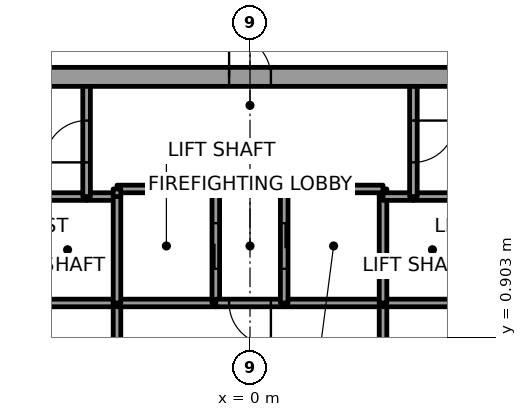
"""IFC4 building model, lengths in metres.
Left out: names, types, materials, properties, quantities, classifications, styles, units other than length and angle.
Written with IfcOpenShell. Run it as: python <this file> out.ifc"""

import sys

from ifc_helpers import new_model, si_unit, direction, frame, frame_2d, origin, place, context, subcontext, project, spatial, rectangle, extrude, element, fill, save


model = new_model("IFC4")
c1 = context("Model", 3, precision=1e-05, world=origin(), true_north=direction((0.0, 1.0)))
c2 = subcontext(c1, "Body", "Model", "MODEL_VIEW")
j1 = project(units=[si_unit("LENGTHUNIT", "METRE"), si_unit("PLANEANGLEUNIT", "RADIAN")], contexts=[c1])
p1 = place(None, origin())
s1 = spatial("IfcSite", under=j1, at=p1, CompositionType="ELEMENT")
p2 = place(p1, origin())
s2 = spatial("IfcBuilding", under=s1, at=p2, CompositionType="ELEMENT")
p3 = place(p2, frame((0.0, 0.0, 137.8)))
s3 = spatial("IfcBuildingStorey", under=s2, at=p3, CompositionType="ELEMENT", Elevation=137.8)
p4 = place(p3, frame((-11.0, 7.75, 0.0), z_axis=(0.0, 0.0, 1.0), x_axis=(1.0, 0.0, 0.0)))
e1 = element("IfcWall", 1, at=p4, inside=s3, PredefinedType="SHEAR", context=c2, shape_type="SweptSolid", body=[
    extrude(rectangle(XDim=22.0, YDim=0.5, at=frame_2d((11.0, 0.0))), origin(), (0.0, 0.0, 1.0), 4.0),
])
p5 = place(p4, frame((10.45, 0.0, 0.0)))
e2 = element("IfcOpeningElement", 2, at=p5, cuts=e1, PredefinedType="OPENING", context=c2, shape_type="SweptSolid", body=[
    extrude(rectangle(XDim=1.1, YDim=2.1, at=frame_2d((0.55, 1.05))), frame((0.0, 0.25, 0.0), z_axis=(0.0, -1.0, 0.0), x_axis=(1.0, 0.0, 0.0)), (0.0, 0.0, 1.0), 0.5),
])
p6 = place(p3, frame((-3.5, 1.8, 0.0), z_axis=(0.0, 0.0, 1.0), x_axis=(-1.0, 0.0, 0.0)))
e3 = element("IfcWall", 3, at=p6, inside=s3, PredefinedType="SOLIDWALL", context=c2, shape_type="SweptSolid", body=[
    extrude(rectangle(XDim=2.6, YDim=0.2, at=frame_2d((1.3, 0.0))), origin(), (0.0, 0.0, 1.0), 3.85),
])
p7 = place(p3, frame((-4.3, 4.6, 0.0), z_axis=(0.0, 0.0, 1.0), x_axis=(-1.0, 0.0, 0.0)))
e4 = element("IfcWall", 4, at=p7, inside=s3, PredefinedType="SOLIDWALL", context=c2, shape_type="SweptSolid", body=[
    extrude(rectangle(XDim=1.8, YDim=0.2, at=frame_2d((0.9, 0.0))), origin(), (0.0, 0.0, 1.0), 3.85),
])
p8 = place(p3, frame((-3.5, 4.6, 0.0), z_axis=(0.0, 0.0, 1.0), x_axis=(-1.0, 0.0, 0.0)))
e5 = element("IfcWall", 5, at=p8, inside=s3, PredefinedType="SOLIDWALL", context=c2, shape_type="SweptSolid", body=[
    extrude(rectangle(XDim=0.8, YDim=0.2, at=frame_2d((0.4, 0.0))), origin(), (0.0, 0.0, 1.0), 3.85),
])
p9 = place(p3, frame((-4.3, 4.6, 0.0), z_axis=(0.0, 0.0, 1.0), x_axis=(0.0, 1.0, 0.0)))
e6 = element("IfcWall", 6, at=p9, inside=s3, PredefinedType="SOLIDWALL", context=c2, shape_type="SweptSolid", body=[
    extrude(rectangle(XDim=2.9, YDim=0.2, at=frame_2d((1.45, 0.0))), origin(), (0.0, 0.0, 1.0), 3.85),
])
p10 = place(p9, frame((0.9, 0.0, 0.0)))
e7 = element("IfcOpeningElement", 7, at=p10, cuts=e6, PredefinedType="OPENING", context=c2, shape_type="SweptSolid", body=[
    extrude(rectangle(XDim=1.1, YDim=2.1, at=frame_2d((0.55, 1.05))), frame((0.0, 0.1, 0.0), z_axis=(0.0, -1.0, 0.0), x_axis=(1.0, 0.0, 0.0)), (0.0, 0.0, 1.0), 0.2),
])
p11 = place(p3, frame((-3.5, 1.8, 0.0), z_axis=(0.0, 0.0, 1.0), x_axis=(0.0, -1.0, 0.0)))
e8 = element("IfcWall", 8, at=p11, inside=s3, PredefinedType="SOLIDWALL", context=c2, shape_type="SweptSolid", body=[
    extrude(rectangle(XDim=3.6, YDim=0.2, at=frame_2d((1.8, 0.0))), origin(), (0.0, 0.0, 1.0), 3.85),
])
p12 = place(p11, frame((1.05, 0.0, 0.0)))
e9 = element("IfcOpeningElement", 9, at=p12, cuts=e8, PredefinedType="OPENING", context=c2, shape_type="SweptSolid", body=[
    extrude(rectangle(XDim=1.5, YDim=2.1, at=frame_2d((0.75, 1.05))), frame((0.0, 0.1, 0.0), z_axis=(0.0, -1.0, 0.0), x_axis=(1.0, 0.0, 0.0)), (0.0, 0.0, 1.0), 0.2),
])
p13 = place(p3, frame((-0.9, 1.8, 0.0), z_axis=(0.0, 0.0, 1.0), x_axis=(-1.0, 0.0, 0.0)))
e10 = element("IfcWall", 10, at=p13, inside=s3, PredefinedType="SOLIDWALL", context=c2, shape_type="SweptSolid", body=[
    extrude(rectangle(XDim=2.6, YDim=0.2, at=frame_2d((1.3, 0.0))), origin(), (0.0, 0.0, 1.0), 3.85),
])
p14 = place(p3, frame((-3.5, 4.6, 0.0), z_axis=(0.0, 0.0, 1.0), x_axis=(0.0, -1.0, 0.0)))
e11 = element("IfcWall", 11, at=p14, inside=s3, PredefinedType="SOLIDWALL", context=c2, shape_type="SweptSolid", body=[
    extrude(rectangle(XDim=2.8, YDim=0.2, at=frame_2d((1.4, 0.0))), origin(), (0.0, 0.0, 1.0), 3.85),
])
p15 = place(p3, frame((-0.9, 1.8, 0.0), z_axis=(0.0, 0.0, 1.0), x_axis=(0.0, 1.0, 0.0)))
e12 = element("IfcWall", 12, at=p15, inside=s3, PredefinedType="SOLIDWALL", context=c2, shape_type="SweptSolid", body=[
    extrude(rectangle(XDim=3.0, YDim=0.2, at=frame_2d((1.5, 0.0))), origin(), (0.0, 0.0, 1.0), 3.85),
])
p16 = place(p15, frame((0.9, 0.0, 0.0)))
e13 = element("IfcOpeningElement", 13, at=p16, cuts=e12, PredefinedType="OPENING", context=c2, shape_type="SweptSolid", body=[
    extrude(rectangle(XDim=1.2, YDim=2.1, at=frame_2d((0.6, 1.05))), frame((0.0, 0.1, 0.0), z_axis=(0.0, -1.0, 0.0), x_axis=(1.0, 0.0, 0.0)), (0.0, 0.0, 1.0), 0.2),
])
p17 = place(p3, frame((-0.9, 4.8, 0.0), z_axis=(0.0, 0.0, 1.0), x_axis=(-1.0, 0.0, 0.0)))
e14 = element("IfcWall", 14, at=p17, inside=s3, PredefinedType="SOLIDWALL", context=c2, shape_type="SweptSolid", body=[
    extrude(rectangle(XDim=2.6, YDim=0.2, at=frame_2d((1.3, 0.0))), origin(), (0.0, 0.0, 1.0), 3.85),
])
p18 = place(p3, frame((-3.5, 4.8, 0.0), z_axis=(0.0, 0.0, 1.0), x_axis=(0.0, -1.0, 0.0)))
e15 = element("IfcWall", 15, at=p18, inside=s3, PredefinedType="SOLIDWALL", context=c2, shape_type="SweptSolid", body=[
    extrude(rectangle(XDim=0.2, YDim=0.2, at=frame_2d((0.1, 0.0))), origin(), (0.0, 0.0, 1.0), 3.85),
])
p19 = place(p3, frame((0.9, 1.8, 0.0), z_axis=(0.0, 0.0, 1.0), x_axis=(-1.0, 0.0, 0.0)))
e16 = element("IfcWall", 16, at=p19, inside=s3, PredefinedType="SOLIDWALL", context=c2, shape_type="SweptSolid", body=[
    extrude(rectangle(XDim=1.8, YDim=0.2, at=frame_2d((0.9, 0.0))), origin(), (0.0, 0.0, 1.0), 3.85),
])
p20 = place(p19, frame((0.35, 0.0, 0.0)))
e17 = element("IfcOpeningElement", 17, at=p20, cuts=e16, PredefinedType="OPENING", context=c2, shape_type="SweptSolid", body=[
    extrude(rectangle(XDim=1.1, YDim=2.1, at=frame_2d((0.55, 1.05))), frame((0.0, 0.1, 0.0), z_axis=(0.0, -1.0, 0.0), x_axis=(1.0, 0.0, 0.0)), (0.0, 0.0, 1.0), 0.2),
])
p21 = place(p3, frame((3.5, 1.8, 0.0), z_axis=(0.0, 0.0, 1.0), x_axis=(-1.0, 0.0, 0.0)))
e18 = element("IfcWall", 18, at=p21, inside=s3, PredefinedType="SOLIDWALL", context=c2, shape_type="SweptSolid", body=[
    extrude(rectangle(XDim=2.6, YDim=0.2, at=frame_2d((1.3, 0.0))), origin(), (0.0, 0.0, 1.0), 3.85),
])
p22 = place(p3, frame((3.5, 4.6, 0.0), z_axis=(0.0, 0.0, 1.0), x_axis=(0.0, 1.0, 0.0)))
e19 = element("IfcWall", 19, at=p22, inside=s3, PredefinedType="SOLIDWALL", context=c2, shape_type="SweptSolid", body=[
    extrude(rectangle(XDim=0.2, YDim=0.2, at=frame_2d((0.1, 0.0))), origin(), (0.0, 0.0, 1.0), 3.85),
])
p23 = place(p3, frame((3.5, 4.8, 0.0), z_axis=(0.0, 0.0, 1.0), x_axis=(-1.0, 0.0, 0.0)))
e20 = element("IfcWall", 20, at=p23, inside=s3, PredefinedType="SOLIDWALL", context=c2, shape_type="SweptSolid", body=[
    extrude(rectangle(XDim=2.6, YDim=0.2, at=frame_2d((1.3, 0.0))), origin(), (0.0, 0.0, 1.0), 3.85),
])
p24 = place(p3, frame((0.9, 4.8, 0.0), z_axis=(0.0, 0.0, 1.0), x_axis=(0.0, -1.0, 0.0)))
e21 = element("IfcWall", 21, at=p24, inside=s3, PredefinedType="SOLIDWALL", context=c2, shape_type="SweptSolid", body=[
    extrude(rectangle(XDim=3.0, YDim=0.2, at=frame_2d((1.5, 0.0))), origin(), (0.0, 0.0, 1.0), 3.85),
])
p25 = place(p24, frame((0.9, 0.0, 0.0)))
e22 = element("IfcOpeningElement", 22, at=p25, cuts=e21, PredefinedType="OPENING", context=c2, shape_type="SweptSolid", body=[
    extrude(rectangle(XDim=1.2, YDim=2.1, at=frame_2d((0.6, 1.05))), frame((0.0, 0.1, 0.0), z_axis=(0.0, -1.0, 0.0), x_axis=(1.0, 0.0, 0.0)), (0.0, 0.0, 1.0), 0.2),
])
p26 = place(p3, frame((3.5, -1.8, 0.0), z_axis=(0.0, 0.0, 1.0), x_axis=(0.0, 1.0, 0.0)))
e23 = element("IfcWall", 23, at=p26, inside=s3, PredefinedType="SOLIDWALL", context=c2, shape_type="SweptSolid", body=[
    extrude(rectangle(XDim=3.6, YDim=0.2, at=frame_2d((1.8, 0.0))), origin(), (0.0, 0.0, 1.0), 3.85),
])
p27 = place(p26, frame((1.05, 0.0, 0.0)))
e24 = element("IfcOpeningElement", 24, at=p27, cuts=e23, PredefinedType="OPENING", context=c2, shape_type="SweptSolid", body=[
    extrude(rectangle(XDim=1.5, YDim=2.1, at=frame_2d((0.75, 1.05))), frame((0.0, 0.1, 0.0), z_axis=(0.0, -1.0, 0.0), x_axis=(1.0, 0.0, 0.0)), (0.0, 0.0, 1.0), 0.2),
])
p28 = place(p3, frame((6.1, 1.8, 0.0), z_axis=(0.0, 0.0, 1.0), x_axis=(-1.0, 0.0, 0.0)))
e25 = element("IfcWall", 25, at=p28, inside=s3, PredefinedType="SOLIDWALL", context=c2, shape_type="SweptSolid", body=[
    extrude(rectangle(XDim=2.6, YDim=0.2, at=frame_2d((1.3, 0.0))), origin(), (0.0, 0.0, 1.0), 3.85),
])
p29 = place(p3, frame((3.5, 1.8, 0.0), z_axis=(0.0, 0.0, 1.0), x_axis=(0.0, 1.0, 0.0)))
e26 = element("IfcWall", 26, at=p29, inside=s3, PredefinedType="SOLIDWALL", context=c2, shape_type="SweptSolid", body=[
    extrude(rectangle(XDim=2.8, YDim=0.2, at=frame_2d((1.4, 0.0))), origin(), (0.0, 0.0, 1.0), 3.85),
])
p30 = place(p3, frame((4.3, 4.6, 0.0), z_axis=(0.0, 0.0, 1.0), x_axis=(-1.0, 0.0, 0.0)))
e27 = element("IfcWall", 27, at=p30, inside=s3, PredefinedType="SOLIDWALL", context=c2, shape_type="SweptSolid", body=[
    extrude(rectangle(XDim=0.8, YDim=0.2, at=frame_2d((0.4, 0.0))), origin(), (0.0, 0.0, 1.0), 3.85),
])
p31 = place(p3, frame((6.1, 4.6, 0.0), z_axis=(0.0, 0.0, 1.0), x_axis=(-1.0, 0.0, 0.0)))
e28 = element("IfcWall", 28, at=p31, inside=s3, PredefinedType="SOLIDWALL", context=c2, shape_type="SweptSolid", body=[
    extrude(rectangle(XDim=1.8, YDim=0.2, at=frame_2d((0.9, 0.0))), origin(), (0.0, 0.0, 1.0), 3.85),
])
p32 = place(p3, frame((4.3, 7.5, 0.0), z_axis=(0.0, 0.0, 1.0), x_axis=(0.0, -1.0, 0.0)))
e29 = element("IfcWall", 29, at=p32, inside=s3, PredefinedType="SOLIDWALL", context=c2, shape_type="SweptSolid", body=[
    extrude(rectangle(XDim=2.9, YDim=0.2, at=frame_2d((1.45, 0.0))), origin(), (0.0, 0.0, 1.0), 3.85),
])
p33 = place(p32, frame((0.9, 0.0, 0.0)))
e30 = element("IfcOpeningElement", 30, at=p33, cuts=e29, PredefinedType="OPENING", context=c2, shape_type="SweptSolid", body=[
    extrude(rectangle(XDim=1.1, YDim=2.1, at=frame_2d((0.55, 1.05))), frame((0.0, 0.1, 0.0), z_axis=(0.0, -1.0, 0.0), x_axis=(1.0, 0.0, 0.0)), (0.0, 0.0, 1.0), 0.2),
])
p34 = place(p16, origin())
e31 = element("IfcDoor", 31, at=p34, inside=s3, OperationType="SLIDING_TO_RIGHT", PredefinedType="DOOR", context=c2, shape_type="SweptSolid", body=[
    extrude(rectangle(XDim=1.2, YDim=2.1, at=frame_2d((0.6, 1.05))), frame((0.0, 0.025, 0.0), z_axis=(0.0, -1.0, 0.0), x_axis=(1.0, 0.0, 0.0)), (0.0, 0.0, 1.0), 0.05),
])
fill(e13, e31)
p35 = place(p25, origin())
e32 = element("IfcDoor", 32, at=p35, inside=s3, OperationType="SLIDING_TO_RIGHT", PredefinedType="DOOR", context=c2, shape_type="SweptSolid", body=[
    extrude(rectangle(XDim=1.2, YDim=2.1, at=frame_2d((0.6, 1.05))), frame((0.0, 0.025, 0.0), z_axis=(0.0, -1.0, 0.0), x_axis=(1.0, 0.0, 0.0)), (0.0, 0.0, 1.0), 0.05),
])
fill(e22, e32)
p36 = place(p20, origin())
e33 = element("IfcDoor", 33, at=p36, inside=s3, OperationType="SINGLE_SWING_LEFT", PredefinedType="DOOR", context=c2, shape_type="SweptSolid", body=[
    extrude(rectangle(XDim=1.1, YDim=2.1, at=frame_2d((0.55, 1.05))), frame((0.0, 0.025, 0.0), z_axis=(0.0, -1.0, 0.0), x_axis=(1.0, 0.0, 0.0)), (0.0, 0.0, 1.0), 0.05),
])
fill(e17, e33)
p37 = place(p10, origin())
e34 = element("IfcDoor", 34, at=p37, inside=s3, OperationType="SINGLE_SWING_LEFT", PredefinedType="DOOR", context=c2, shape_type="SweptSolid", body=[
    extrude(rectangle(XDim=1.1, YDim=2.1, at=frame_2d((0.55, 1.05))), frame((0.0, 0.025, 0.0), z_axis=(0.0, -1.0, 0.0), x_axis=(1.0, 0.0, 0.0)), (0.0, 0.0, 1.0), 0.05),
])
fill(e7, e34)
p38 = place(p33, origin())
e35 = element("IfcDoor", 35, at=p38, inside=s3, OperationType="SINGLE_SWING_RIGHT", PredefinedType="DOOR", context=c2, shape_type="SweptSolid", body=[
    extrude(rectangle(XDim=1.1, YDim=2.1, at=frame_2d((0.55, 1.05))), frame((0.0, 0.025, 0.0), z_axis=(0.0, -1.0, 0.0), x_axis=(1.0, 0.0, 0.0)), (0.0, 0.0, 1.0), 0.05),
])
fill(e30, e35)
p39 = place(p5, origin())
e36 = element("IfcDoor", 36, at=p39, inside=s3, OperationType="SINGLE_SWING_RIGHT", PredefinedType="DOOR", context=c2, shape_type="SweptSolid", body=[
    extrude(rectangle(XDim=1.1, YDim=2.1, at=frame_2d((0.55, 1.05))), frame((0.0, 0.025, 0.0), z_axis=(0.0, -1.0, 0.0), x_axis=(1.0, 0.0, 0.0)), (0.0, 0.0, 1.0), 0.05),
])
fill(e2, e36)
save(model, sys.argv[1])
